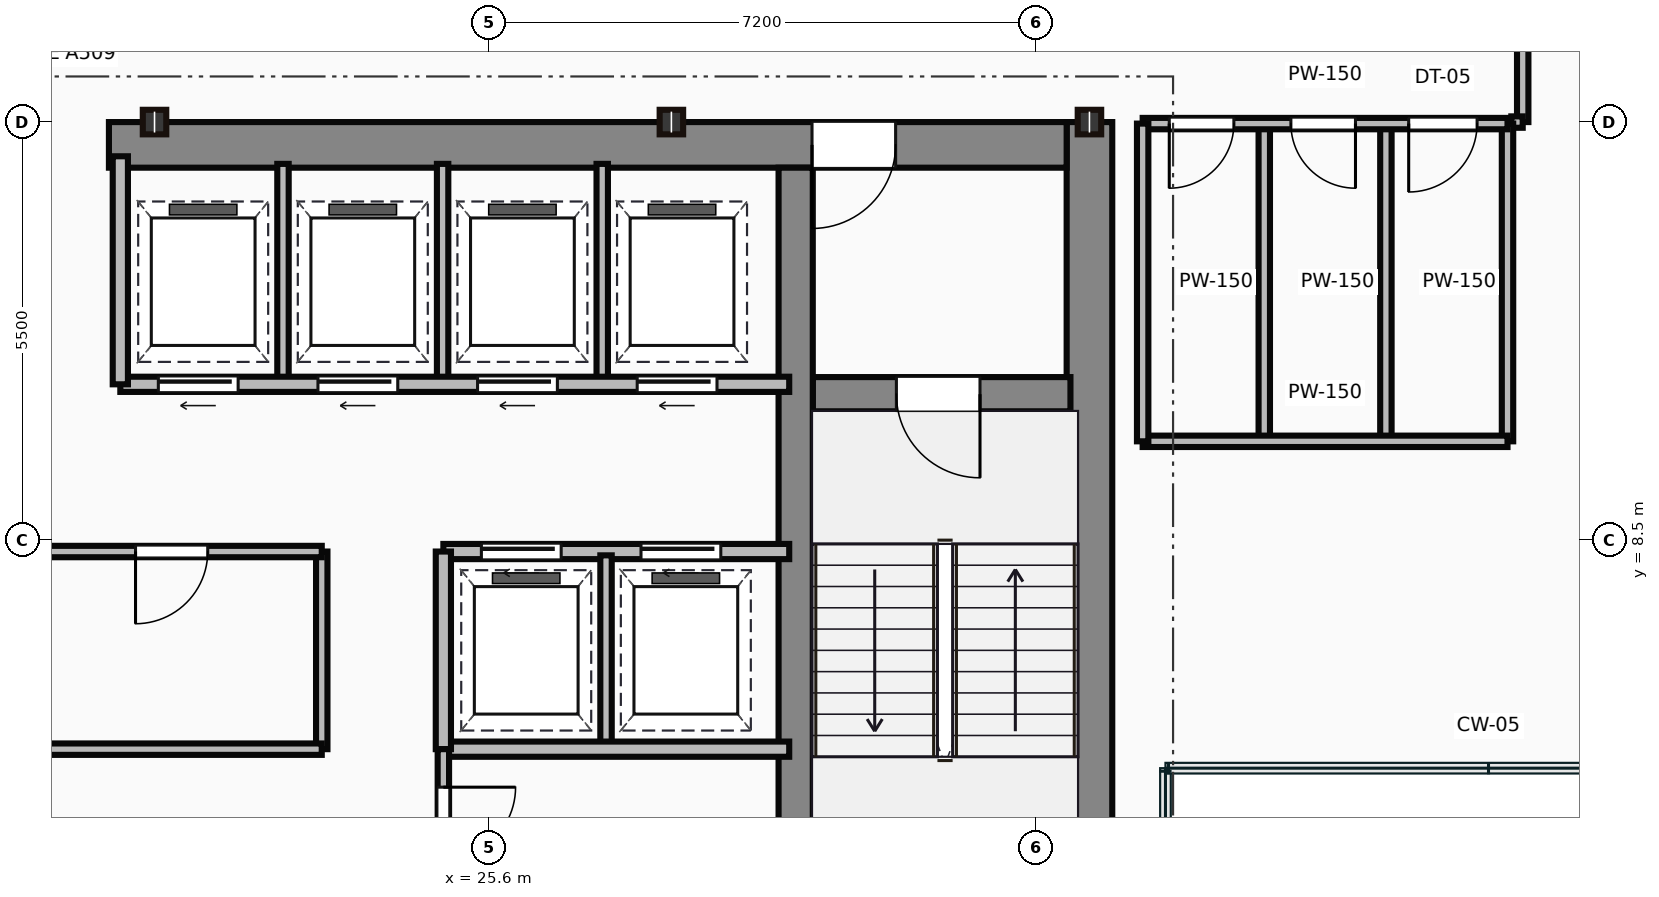
"""IFC4 building model, lengths in metres.
Left out: names, types, materials, properties, quantities, classifications, styles, units other than length and angle.
Written with IfcOpenShell. Run it as: python <this file> out.ifc"""

import sys

from ifc_helpers import new_model, si_unit, direction, frame, frame_2d, origin, origin_2d, place, context, subcontext, project, spatial, rectangle, i_section, extrude, source, transform, mapped, element, fill, save


model = new_model("IFC4")
c1 = context("Model", 3, precision=1e-05, world=origin(), true_north=direction((0.0, 1.0)))
c2 = subcontext(c1, "Body", "Model", "MODEL_VIEW")
j1 = project(units=[si_unit("LENGTHUNIT", "METRE"), si_unit("PLANEANGLEUNIT", "RADIAN")], contexts=[c1])
p1 = place(None, origin())
s1 = spatial("IfcSite", under=j1, at=p1, CompositionType="ELEMENT")
p2 = place(p1, origin())
s2 = spatial("IfcBuilding", under=s1, at=p2, CompositionType="ELEMENT")
p3 = place(p2, frame((0.0, 0.0, 217.8)))
s3 = spatial("IfcBuildingStorey", under=s2, at=p3, CompositionType="ELEMENT", Elevation=217.8)
m1 = source(origin(), c2, "Body", "SweptSolid", [
    extrude(rectangle(XDim=13.1, YDim=0.6, at=frame_2d((6.55, 0.0))), origin(), (0.0, 0.0, 1.0), 3.65),
])
p4 = place(p3, frame((33.5, 0.9, 0.0), z_axis=(0.0, 0.0, 1.0), x_axis=(0.0, 1.0, 0.0)))
e1 = element("IfcWall", 1, at=p4, inside=s3, PredefinedType="SHEAR", context=c2, shape_type="MappedRepresentation", body=[
    mapped(m1, transform((0.0, 0.0, 0.0))),
])
m2 = source(origin(), c2, "Body", "SweptSolid", [
    extrude(rectangle(XDim=12.6, YDim=0.6, at=frame_2d((6.3, 0.0))), origin(), (0.0, 0.0, 1.0), 3.65),
])
p5 = place(p3, frame((20.6, 13.7, 0.0), z_axis=(0.0, 0.0, 1.0), x_axis=(1.0, 0.0, 0.0)))
e2 = element("IfcWall", 2, at=p5, inside=s3, PredefinedType="SHEAR", context=c2, shape_type="MappedRepresentation", body=[
    mapped(m2, transform((0.0, 0.0, 0.0))),
])
p6 = place(p5, frame((9.25, 0.0, 0.0)))
e3 = element("IfcOpeningElement", 3, at=p6, cuts=e2, PredefinedType="OPENING", context=c2, shape_type="SweptSolid", body=[
    extrude(rectangle(XDim=1.1, YDim=2.15, at=frame_2d((0.55, 1.075))), frame((0.0, 0.31, 0.0), z_axis=(0.0, -1.0, 0.0), x_axis=(1.0, 0.0, 0.0)), (0.0, 0.0, 1.0), 0.62),
])
m3 = source(origin(), c2, "Body", "SweptSolid", [
    extrude(rectangle(XDim=12.5, YDim=0.45, at=frame_2d((6.25, 0.0))), origin(), (0.0, 0.0, 1.0), 3.65),
])
p7 = place(p3, frame((29.635, 0.9, 0.0), z_axis=(0.0, 0.0, 1.0), x_axis=(0.0, 1.0, 0.0)))
e4 = element("IfcWall", 4, at=p7, inside=s3, PredefinedType="SHEAR", context=c2, shape_type="MappedRepresentation", body=[
    mapped(m3, transform((0.0, 0.0, 0.0))),
])
m4 = source(origin(), c2, "Body", "SweptSolid", [
    extrude(rectangle(XDim=3.39, YDim=0.45, at=frame_2d((1.695, 0.0))), origin(), (0.0, 0.0, 1.0), 3.65),
])
p8 = place(p3, frame((29.86, 10.42, 0.0), z_axis=(0.0, 0.0, 1.0), x_axis=(1.0, 0.0, 0.0)))
e5 = element("IfcWall", 5, at=p8, inside=s3, PredefinedType="SHEAR", context=c2, shape_type="MappedRepresentation", body=[
    mapped(m4, transform((0.0, 0.0, 0.0))),
])
p9 = place(p8, frame((1.1, 0.0, 0.0)))
e6 = element("IfcOpeningElement", 6, at=p9, cuts=e5, PredefinedType="OPENING", context=c2, shape_type="SweptSolid", body=[
    extrude(rectangle(XDim=1.1, YDim=2.15, at=frame_2d((0.55, 1.075))), frame((0.0, 0.235, 0.0), z_axis=(0.0, -1.0, 0.0), x_axis=(1.0, 0.0, 0.0)), (0.0, 0.0, 1.0), 0.47),
])
m5 = source(origin(), c2, "Body", "SweptSolid", [
    extrude(i_section(OverallWidth=0.309, OverallDepth=0.323, WebThickness=0.014, FlangeThickness=0.023, at=origin_2d()), origin(), (0.0, 0.0, 1.0), 3.65),
])
for number, where, z_axis, x_axis in (
    (7, (21.2, 14.0, 0.0), (0.0, 0.0, 1.0), (1.0, 0.0, 0.0)),
    (8, (28.0, 14.0, 0.0), (0.0, 0.0, 1.0), (1.0, 0.0, 0.0)),
    (9, (33.5, 14.0, 0.0), (0.0, 0.0, 1.0), (1.0, 0.0, 0.0)),
):
    element("IfcColumn", number, at=place(p3, frame(where, z_axis=z_axis, x_axis=x_axis)), inside=s3, PredefinedType="COLUMN", context=c2, shape_type="MappedRepresentation", body=[
        mapped(m5, transform((0.0, 0.0, 0.0))),
    ])
m6 = source(origin(), c2, "Body", "SweptSolid", [
    extrude(rectangle(XDim=11.85, YDim=0.15, at=frame_2d((5.925, 0.0))), origin(), (0.0, 0.0, 1.0), 3.4),
])
p10 = place(p3, frame((11.55, 5.75, 0.0), z_axis=(0.0, 0.0, 1.0), x_axis=(1.0, 0.0, 0.0)))
e10 = element("IfcWall", 10, at=p10, inside=s3, PredefinedType="PARTITIONING", context=c2, shape_type="MappedRepresentation", body=[
    mapped(m6, transform((0.0, 0.0, 0.0))),
])
p11 = place(p3, frame((11.55, 8.35, 0.0), z_axis=(0.0, 0.0, 1.0), x_axis=(1.0, 0.0, 0.0)))
e11 = element("IfcWall", 11, at=p11, inside=s3, PredefinedType="PARTITIONING", context=c2, shape_type="MappedRepresentation", body=[
    mapped(m6, transform((0.0, 0.0, 0.0))),
])
p12 = place(p11, frame((1.1, 0.0, 0.0)))
e12 = element("IfcOpeningElement", 12, at=p12, cuts=e11, PredefinedType="OPENING", context=c2, shape_type="SweptSolid", body=[
    extrude(rectangle(XDim=0.95, YDim=2.15, at=frame_2d((0.475, 1.075))), frame((0.0, 0.085, 0.0), z_axis=(0.0, -1.0, 0.0), x_axis=(1.0, 0.0, 0.0)), (0.0, 0.0, 1.0), 0.17),
])
p13 = place(p11, frame((9.4, 0.0, 0.0)))
e13 = element("IfcOpeningElement", 13, at=p13, cuts=e11, PredefinedType="OPENING", context=c2, shape_type="SweptSolid", body=[
    extrude(rectangle(XDim=0.95, YDim=2.15, at=frame_2d((0.475, 1.075))), frame((0.0, 0.085, 0.0), z_axis=(0.0, -1.0, 0.0), x_axis=(1.0, 0.0, 0.0)), (0.0, 0.0, 1.0), 0.17),
])
m7 = source(origin(), c2, "Body", "SweptSolid", [
    extrude(rectangle(XDim=2.6, YDim=0.15, at=frame_2d((1.3, 0.0))), origin(), (0.0, 0.0, 1.0), 3.4),
])
p14 = place(p3, frame((23.4, 5.75, 0.0), z_axis=(0.0, 0.0, 1.0), x_axis=(0.0, 1.0, 0.0)))
e14 = element("IfcWall", 14, at=p14, inside=s3, PredefinedType="PARTITIONING", context=c2, shape_type="MappedRepresentation", body=[
    mapped(m7, transform((0.0, 0.0, 0.0))),
])
m8 = source(origin(), c2, "Body", "SweptSolid", [
    extrude(rectangle(XDim=8.8, YDim=0.2, at=frame_2d((4.4, 0.0))), origin(), (0.0, 0.0, 1.0), 3.4),
])
p15 = place(p3, frame((20.75, 10.55, 0.0), z_axis=(0.0, 0.0, 1.0), x_axis=(1.0, 0.0, 0.0)))
e15 = element("IfcWall", 15, at=p15, inside=s3, PredefinedType="PARTITIONING", context=c2, shape_type="MappedRepresentation", body=[
    mapped(m8, transform((0.0, 0.0, 0.0))),
])
p16 = place(p15, frame((0.5, 0.0, 0.0)))
e16 = element("IfcOpeningElement", 16, at=p16, cuts=e15, PredefinedType="OPENING", context=c2, shape_type="SweptSolid", body=[
    extrude(rectangle(XDim=1.05, YDim=2.15, at=frame_2d((0.525, 1.075))), frame((0.0, 0.11, 0.0), z_axis=(0.0, -1.0, 0.0), x_axis=(1.0, 0.0, 0.0)), (0.0, 0.0, 1.0), 0.22),
])
p17 = place(p15, frame((2.6, 0.0, 0.0)))
e17 = element("IfcOpeningElement", 17, at=p17, cuts=e15, PredefinedType="OPENING", context=c2, shape_type="SweptSolid", body=[
    extrude(rectangle(XDim=1.05, YDim=2.15, at=frame_2d((0.525, 1.075))), frame((0.0, 0.11, 0.0), z_axis=(0.0, -1.0, 0.0), x_axis=(1.0, 0.0, 0.0)), (0.0, 0.0, 1.0), 0.22),
])
p18 = place(p15, frame((4.7, 0.0, 0.0)))
e18 = element("IfcOpeningElement", 18, at=p18, cuts=e15, PredefinedType="OPENING", context=c2, shape_type="SweptSolid", body=[
    extrude(rectangle(XDim=1.05, YDim=2.15, at=frame_2d((0.525, 1.075))), frame((0.0, 0.11, 0.0), z_axis=(0.0, -1.0, 0.0), x_axis=(1.0, 0.0, 0.0)), (0.0, 0.0, 1.0), 0.22),
])
p19 = place(p15, frame((6.8, 0.0, 0.0)))
e19 = element("IfcOpeningElement", 19, at=p19, cuts=e15, PredefinedType="OPENING", context=c2, shape_type="SweptSolid", body=[
    extrude(rectangle(XDim=1.05, YDim=2.15, at=frame_2d((0.525, 1.075))), frame((0.0, 0.11, 0.0), z_axis=(0.0, -1.0, 0.0), x_axis=(1.0, 0.0, 0.0)), (0.0, 0.0, 1.0), 0.22),
])
m9 = source(origin(), c2, "Body", "SweptSolid", [
    extrude(rectangle(XDim=3.0, YDim=0.2, at=frame_2d((1.5, 0.0))), origin(), (0.0, 0.0, 1.0), 3.4),
])
p20 = place(p3, frame((20.75, 10.55, 0.0), z_axis=(0.0, 0.0, 1.0), x_axis=(0.0, 1.0, 0.0)))
e20 = element("IfcWall", 20, at=p20, inside=s3, PredefinedType="PARTITIONING", context=c2, shape_type="MappedRepresentation", body=[
    mapped(m9, transform((0.0, 0.0, 0.0))),
])
m10 = source(origin(), c2, "Body", "SweptSolid", [
    extrude(rectangle(XDim=2.85, YDim=0.15, at=frame_2d((1.425, 0.0))), origin(), (0.0, 0.0, 1.0), 3.4),
])
for number, where, z_axis, x_axis in (
    (21, (22.89, 10.6, 0.0), (0.0, 0.0, 1.0), (0.0, 1.0, 0.0)),
    (22, (24.99, 10.6, 0.0), (0.0, 0.0, 1.0), (0.0, 1.0, 0.0)),
    (23, (27.09, 10.6, 0.0), (0.0, 0.0, 1.0), (0.0, 1.0, 0.0)),
):
    element("IfcWall", number, at=place(p3, frame(where, z_axis=z_axis, x_axis=x_axis)), inside=s3, PredefinedType="PARTITIONING", context=c2, shape_type="MappedRepresentation", body=[
        mapped(m10, transform((0.0, 0.0, 0.0))),
    ])
m11 = source(origin(), c2, "Body", "SweptSolid", [
    extrude(rectangle(XDim=4.55, YDim=0.2, at=frame_2d((2.275, 0.0))), origin(), (0.0, 0.0, 1.0), 3.4),
])
p21 = place(p3, frame((25.0, 8.35, 0.0), z_axis=(0.0, 0.0, 1.0), x_axis=(1.0, 0.0, 0.0)))
e24 = element("IfcWall", 24, at=p21, inside=s3, PredefinedType="PARTITIONING", context=c2, shape_type="MappedRepresentation", body=[
    mapped(m11, transform((0.0, 0.0, 0.0))),
])
p22 = place(p21, frame((0.5, 0.0, 0.0)))
e25 = element("IfcOpeningElement", 25, at=p22, cuts=e24, PredefinedType="OPENING", context=c2, shape_type="SweptSolid", body=[
    extrude(rectangle(XDim=1.05, YDim=2.15, at=frame_2d((0.525, 1.075))), frame((0.0, 0.11, 0.0), z_axis=(0.0, -1.0, 0.0), x_axis=(1.0, 0.0, 0.0)), (0.0, 0.0, 1.0), 0.22),
])
p23 = place(p21, frame((2.6, 0.0, 0.0)))
e26 = element("IfcOpeningElement", 26, at=p23, cuts=e24, PredefinedType="OPENING", context=c2, shape_type="SweptSolid", body=[
    extrude(rectangle(XDim=1.05, YDim=2.15, at=frame_2d((0.525, 1.075))), frame((0.0, 0.11, 0.0), z_axis=(0.0, -1.0, 0.0), x_axis=(1.0, 0.0, 0.0)), (0.0, 0.0, 1.0), 0.22),
])
p24 = place(p3, frame((25.0, 5.75, 0.0), z_axis=(0.0, 0.0, 1.0), x_axis=(1.0, 0.0, 0.0)))
e27 = element("IfcWall", 27, at=p24, inside=s3, PredefinedType="PARTITIONING", context=c2, shape_type="MappedRepresentation", body=[
    mapped(m11, transform((0.0, 0.0, 0.0))),
])
m12 = source(origin(), c2, "Body", "SweptSolid", [
    extrude(rectangle(XDim=2.6, YDim=0.2, at=frame_2d((1.3, 0.0))), origin(), (0.0, 0.0, 1.0), 3.4),
])
p25 = place(p3, frame((25.0, 5.75, 0.0), z_axis=(0.0, 0.0, 1.0), x_axis=(0.0, 1.0, 0.0)))
e28 = element("IfcWall", 28, at=p25, inside=s3, PredefinedType="PARTITIONING", context=c2, shape_type="MappedRepresentation", body=[
    mapped(m12, transform((0.0, 0.0, 0.0))),
])
m13 = source(origin(), c2, "Body", "SweptSolid", [
    extrude(rectangle(XDim=2.5, YDim=0.15, at=frame_2d((1.25, 0.0))), origin(), (0.0, 0.0, 1.0), 3.4),
])
p26 = place(p3, frame((27.14, 5.8, 0.0), z_axis=(0.0, 0.0, 1.0), x_axis=(0.0, 1.0, 0.0)))
e29 = element("IfcWall", 29, at=p26, inside=s3, PredefinedType="PARTITIONING", context=c2, shape_type="MappedRepresentation", body=[
    mapped(m13, transform((0.0, 0.0, 0.0))),
])
m14 = source(origin(), c2, "Body", "SweptSolid", [
    extrude(rectangle(XDim=4.9, YDim=0.15, at=frame_2d((2.45, 0.0))), origin(), (0.0, 0.0, 1.0), 3.4),
])
p27 = place(p3, frame((25.0, 0.85, 0.0), z_axis=(0.0, 0.0, 1.0), x_axis=(0.0, 1.0, 0.0)))
e30 = element("IfcWall", 30, at=p27, inside=s3, PredefinedType="PARTITIONING", context=c2, shape_type="MappedRepresentation", body=[
    mapped(m14, transform((0.0, 0.0, 0.0))),
])
p28 = place(p27, frame((1.8, 0.0, 0.0)))
e31 = element("IfcOpeningElement", 31, at=p28, cuts=e30, PredefinedType="OPENING", context=c2, shape_type="SweptSolid", body=[
    extrude(rectangle(XDim=0.95, YDim=2.15, at=frame_2d((0.475, 1.075))), frame((0.0, 0.085, 0.0), z_axis=(0.0, -1.0, 0.0), x_axis=(1.0, 0.0, 0.0)), (0.0, 0.0, 1.0), 0.17),
])
p29 = place(p27, frame((3.45, 0.0, 0.0)))
e32 = element("IfcOpeningElement", 32, at=p29, cuts=e30, PredefinedType="OPENING", context=c2, shape_type="SweptSolid", body=[
    extrude(rectangle(XDim=0.95, YDim=2.15, at=frame_2d((0.475, 1.075))), frame((0.0, 0.085, 0.0), z_axis=(0.0, -1.0, 0.0), x_axis=(1.0, 0.0, 0.0)), (0.0, 0.0, 1.0), 0.17),
])
m15 = source(origin(), c2, "Body", "SweptSolid", [
    extrude(rectangle(XDim=4.8, YDim=0.15, at=frame_2d((2.4, 0.0))), origin(), (0.0, 0.0, 1.0), 2.787),
])
p30 = place(p3, frame((34.2, 13.98, 0.0), z_axis=(0.0, 0.0, 1.0), x_axis=(1.0, 0.0, 0.0)))
e33 = element("IfcWall", 33, at=p30, inside=s3, PredefinedType="PARTITIONING", context=c2, shape_type="MappedRepresentation", body=[
    mapped(m15, transform((0.0, 0.0, 0.0))),
])
p31 = place(p30, frame((0.35, 0.0, 0.0)))
e34 = element("IfcOpeningElement", 34, at=p31, cuts=e33, PredefinedType="OPENING", context=c2, shape_type="SweptSolid", body=[
    extrude(rectangle(XDim=0.85, YDim=2.1, at=frame_2d((0.425, 1.05))), frame((0.0, 0.085, 0.0), z_axis=(0.0, -1.0, 0.0), x_axis=(1.0, 0.0, 0.0)), (0.0, 0.0, 1.0), 0.17),
])
p32 = place(p30, frame((1.95, 0.0, 0.0)))
e35 = element("IfcOpeningElement", 35, at=p32, cuts=e33, PredefinedType="OPENING", context=c2, shape_type="SweptSolid", body=[
    extrude(rectangle(XDim=0.85, YDim=2.1, at=frame_2d((0.425, 1.05))), frame((0.0, 0.085, 0.0), z_axis=(0.0, -1.0, 0.0), x_axis=(1.0, 0.0, 0.0)), (0.0, 0.0, 1.0), 0.17),
])
p33 = place(p30, frame((3.5, 0.0, 0.0)))
e36 = element("IfcOpeningElement", 36, at=p33, cuts=e33, PredefinedType="OPENING", context=c2, shape_type="SweptSolid", body=[
    extrude(rectangle(XDim=0.9, YDim=2.1, at=frame_2d((0.45, 1.05))), frame((0.0, 0.085, 0.0), z_axis=(0.0, -1.0, 0.0), x_axis=(1.0, 0.0, 0.0)), (0.0, 0.0, 1.0), 0.17),
])
m16 = source(origin(), c2, "Body", "SweptSolid", [
    extrude(rectangle(XDim=4.8, YDim=0.15, at=frame_2d((2.4, 0.0))), origin(), (0.0, 0.0, 1.0), 3.4),
])
p34 = place(p3, frame((34.2, 9.8, 0.0), z_axis=(0.0, 0.0, 1.0), x_axis=(1.0, 0.0, 0.0)))
e37 = element("IfcWall", 37, at=p34, inside=s3, PredefinedType="PARTITIONING", context=c2, shape_type="MappedRepresentation", body=[
    mapped(m16, transform((0.0, 0.0, 0.0))),
])
m17 = source(origin(), c2, "Body", "SweptSolid", [
    extrude(rectangle(XDim=4.18, YDim=0.15, at=frame_2d((2.09, 0.0))), origin(), (0.0, 0.0, 1.0), 3.4),
])
for number, where, z_axis, x_axis in (
    (38, (39.0, 9.8, 0.0), (0.0, 0.0, 1.0), (0.0, 1.0, 0.0)),
    (39, (34.2, 9.8, 0.0), (0.0, 0.0, 1.0), (0.0, 1.0, 0.0)),
    (40, (35.8, 9.8, 0.0), (0.0, 0.0, 1.0), (0.0, 1.0, 0.0)),
    (41, (37.4, 9.8, 0.0), (0.0, 0.0, 1.0), (0.0, 1.0, 0.0)),
):
    element("IfcWall", number, at=place(p3, frame(where, z_axis=z_axis, x_axis=x_axis)), inside=s3, PredefinedType="PARTITIONING", context=c2, shape_type="MappedRepresentation", body=[
        mapped(m17, transform((0.0, 0.0, 0.0))),
    ])
m18 = source(origin(), c2, "Body", "SweptSolid", [
    extrude(rectangle(XDim=2.2, YDim=0.15, at=frame_2d((1.1, 0.0))), origin(), (0.0, 0.0, 1.0), 3.4),
])
p35 = place(p3, frame((39.2, 16.2, 0.0), z_axis=(0.0, 0.0, 1.0), x_axis=(0.0, -1.0, 0.0)))
e42 = element("IfcWall", 42, at=p35, inside=s3, PredefinedType="PARTITIONING", context=c2, shape_type="MappedRepresentation", body=[
    mapped(m18, transform((0.0, 0.0, 0.0))),
])
m19 = source(origin(), c2, "Body", "SweptSolid", [
    extrude(rectangle(XDim=0.15, YDim=0.15, at=frame_2d((0.075, 0.0))), origin(), (0.0, 0.0, 1.0), 3.4),
])
p36 = place(p3, frame((39.2, 14.0, 0.0), z_axis=(0.0, 0.0, 1.0), x_axis=(-1.0, 0.0, 0.0)))
e43 = element("IfcWall", 43, at=p36, inside=s3, PredefinedType="PARTITIONING", context=c2, shape_type="MappedRepresentation", body=[
    mapped(m19, transform((0.0, 0.0, 0.0))),
])
m20 = source(origin(), c2, "Body", "SweptSolid", [
    extrude(rectangle(XDim=1.1, YDim=2.15, at=frame_2d((0.55, 1.075))), frame((0.0, 0.025, 0.0), z_axis=(0.0, -1.0, 0.0), x_axis=(1.0, 0.0, 0.0)), (0.0, 0.0, 1.0), 0.05),
])
p37 = place(p9, frame((1.1, 0.0, 0.0), z_axis=(0.0, 0.0, 1.0), x_axis=(-1.0, 0.0, 0.0)))
e44 = element("IfcDoor", 44, at=p37, inside=s3, OperationType="SINGLE_SWING_RIGHT", PredefinedType="DOOR", context=c2, shape_type="MappedRepresentation", body=[
    mapped(m20, transform((0.0, 0.0, 0.0))),
])
fill(e6, e44)
p38 = place(p6, origin())
e45 = element("IfcDoor", 45, at=p38, inside=s3, OperationType="SINGLE_SWING_LEFT", PredefinedType="DOOR", context=c2, shape_type="MappedRepresentation", body=[
    mapped(m20, transform((0.0, 0.0, 0.0))),
])
fill(e3, e45)
m21 = source(origin(), c2, "Body", "SweptSolid", [
    extrude(rectangle(XDim=0.95, YDim=2.15, at=frame_2d((0.475, 1.075))), frame((0.0, 0.025, 0.0), z_axis=(0.0, -1.0, 0.0), x_axis=(1.0, 0.0, 0.0)), (0.0, 0.0, 1.0), 0.05),
])
p39 = place(p13, origin())
e46 = element("IfcDoor", 46, at=p39, inside=s3, OperationType="SINGLE_SWING_LEFT", PredefinedType="DOOR", context=c2, shape_type="MappedRepresentation", body=[
    mapped(m21, transform((0.0, 0.0, 0.0))),
])
fill(e13, e46)
m22 = source(origin(), c2, "Body", "SweptSolid", [
    extrude(rectangle(XDim=1.05, YDim=2.15, at=frame_2d((0.525, 1.075))), frame((0.0, 0.025, 0.0), z_axis=(0.0, -1.0, 0.0), x_axis=(1.0, 0.0, 0.0)), (0.0, 0.0, 1.0), 0.05),
])
p40 = place(p16, frame((1.05, 0.0, 0.0), z_axis=(0.0, 0.0, 1.0), x_axis=(-1.0, 0.0, 0.0)))
e47 = element("IfcDoor", 47, at=p40, inside=s3, OperationType="SLIDING_TO_LEFT", PredefinedType="DOOR", context=c2, shape_type="MappedRepresentation", body=[
    mapped(m22, transform((0.0, 0.0, 0.0))),
])
fill(e16, e47)
p41 = place(p17, frame((1.05, 0.0, 0.0), z_axis=(0.0, 0.0, 1.0), x_axis=(-1.0, 0.0, 0.0)))
e48 = element("IfcDoor", 48, at=p41, inside=s3, OperationType="SLIDING_TO_LEFT", PredefinedType="DOOR", context=c2, shape_type="MappedRepresentation", body=[
    mapped(m22, transform((0.0, 0.0, 0.0))),
])
fill(e17, e48)
p42 = place(p18, frame((1.05, 0.0, 0.0), z_axis=(0.0, 0.0, 1.0), x_axis=(-1.0, 0.0, 0.0)))
e49 = element("IfcDoor", 49, at=p42, inside=s3, OperationType="SLIDING_TO_LEFT", PredefinedType="DOOR", context=c2, shape_type="MappedRepresentation", body=[
    mapped(m22, transform((0.0, 0.0, 0.0))),
])
fill(e18, e49)
p43 = place(p19, frame((1.05, 0.0, 0.0), z_axis=(0.0, 0.0, 1.0), x_axis=(-1.0, 0.0, 0.0)))
e50 = element("IfcDoor", 50, at=p43, inside=s3, OperationType="SLIDING_TO_LEFT", PredefinedType="DOOR", context=c2, shape_type="MappedRepresentation", body=[
    mapped(m22, transform((0.0, 0.0, 0.0))),
])
fill(e19, e50)
p44 = place(p22, origin())
e51 = element("IfcDoor", 51, at=p44, inside=s3, OperationType="SLIDING_TO_LEFT", PredefinedType="DOOR", context=c2, shape_type="MappedRepresentation", body=[
    mapped(m22, transform((0.0, 0.0, 0.0))),
])
fill(e25, e51)
p45 = place(p23, origin())
e52 = element("IfcDoor", 52, at=p45, inside=s3, OperationType="SLIDING_TO_LEFT", PredefinedType="DOOR", context=c2, shape_type="MappedRepresentation", body=[
    mapped(m22, transform((0.0, 0.0, 0.0))),
])
fill(e26, e52)
p46 = place(p29, origin())
e53 = element("IfcDoor", 53, at=p46, inside=s3, OperationType="SINGLE_SWING_RIGHT", PredefinedType="DOOR", context=c2, shape_type="MappedRepresentation", body=[
    mapped(m21, transform((0.0, 0.0, 0.0))),
])
fill(e32, e53)
m23 = source(origin(), c2, "Body", "SweptSolid", [
    extrude(rectangle(XDim=0.85, YDim=2.1, at=frame_2d((0.425, 1.05))), frame((0.0, 0.025, 0.0), z_axis=(0.0, -1.0, 0.0), x_axis=(1.0, 0.0, 0.0)), (0.0, 0.0, 1.0), 0.05),
])
p47 = place(p31, frame((0.85, 0.0, 0.0), z_axis=(0.0, 0.0, 1.0), x_axis=(-1.0, 0.0, 0.0)))
e54 = element("IfcDoor", 54, at=p47, inside=s3, OperationType="SINGLE_SWING_LEFT", PredefinedType="DOOR", context=c2, shape_type="MappedRepresentation", body=[
    mapped(m23, transform((0.0, 0.0, 0.0))),
])
fill(e34, e54)
p48 = place(p32, frame((0.85, 0.0, 0.0), z_axis=(0.0, 0.0, 1.0), x_axis=(-1.0, 0.0, 0.0)))
e55 = element("IfcDoor", 55, at=p48, inside=s3, OperationType="SINGLE_SWING_RIGHT", PredefinedType="DOOR", context=c2, shape_type="MappedRepresentation", body=[
    mapped(m23, transform((0.0, 0.0, 0.0))),
])
fill(e35, e55)
m24 = source(origin(), c2, "Body", "SweptSolid", [
    extrude(rectangle(XDim=0.9, YDim=2.1, at=frame_2d((0.45, 1.05))), frame((0.0, 0.025, 0.0), z_axis=(0.0, -1.0, 0.0), x_axis=(1.0, 0.0, 0.0)), (0.0, 0.0, 1.0), 0.05),
])
p49 = place(p33, frame((0.9, 0.0, 0.0), z_axis=(0.0, 0.0, 1.0), x_axis=(-1.0, 0.0, 0.0)))
e56 = element("IfcDoor", 56, at=p49, inside=s3, OperationType="SINGLE_SWING_LEFT", PredefinedType="DOOR", context=c2, shape_type="MappedRepresentation", body=[
    mapped(m24, transform((0.0, 0.0, 0.0))),
])
fill(e36, e56)
save(model, sys.argv[1])
